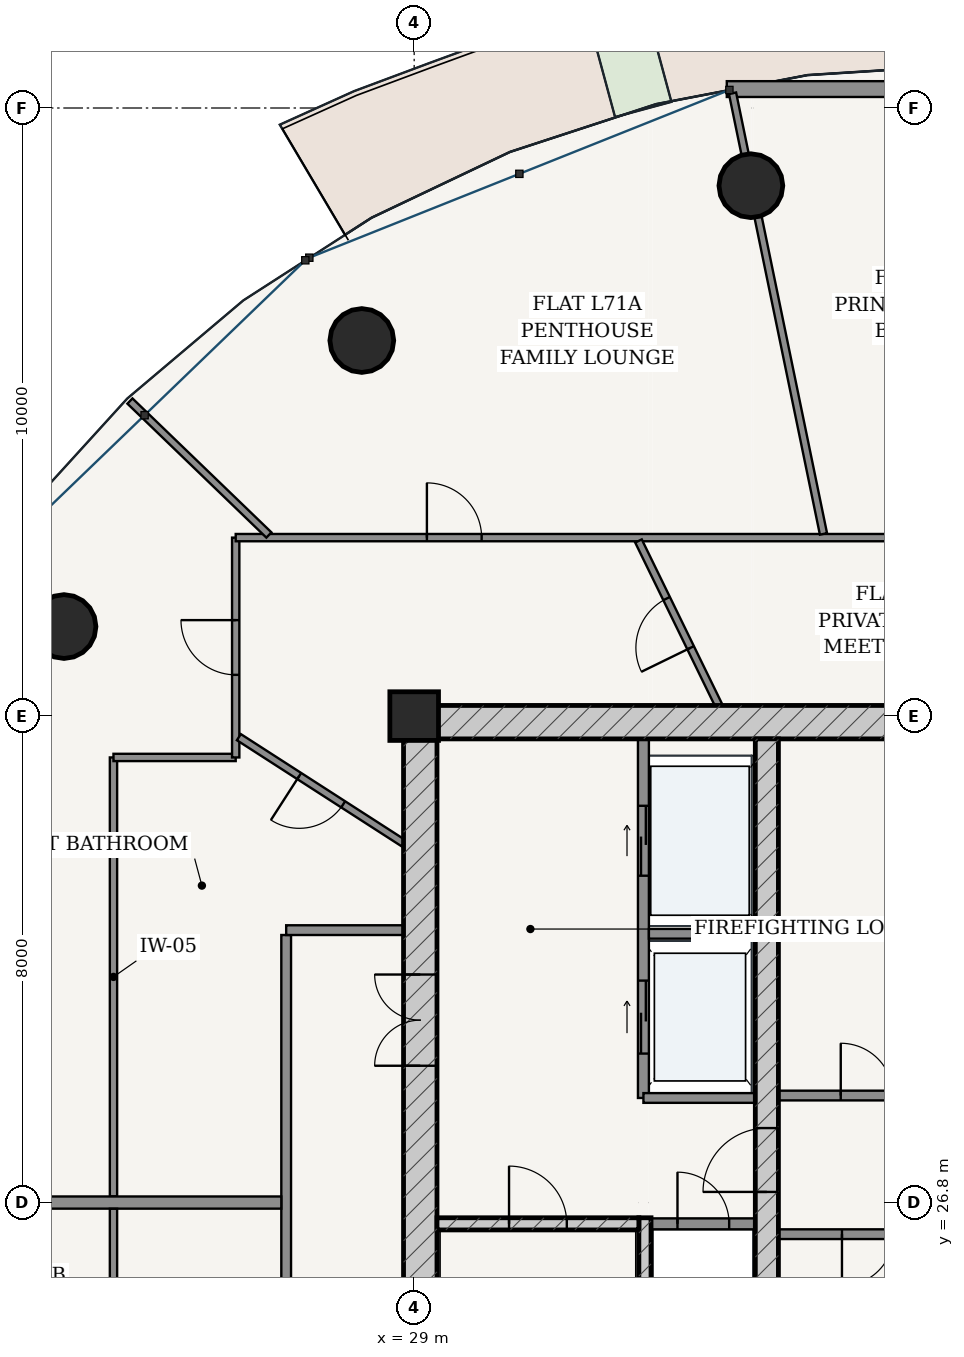
"""IFC4 building model, lengths in metres.
Left out: names, types, materials, properties, quantities, classifications, styles, units other than length and angle.
Written with IfcOpenShell. Run it as: python <this file> out.ifc"""

import sys

from ifc_helpers import new_model, si_unit, direction, frame, frame_2d, origin, origin_2d, place, context, subcontext, project, spatial, rectangle, hollow_circle, extrude, source, transform, mapped, element, fill, save


model = new_model("IFC4")
c1 = context("Model", 3, precision=1e-05, world=origin(), true_north=direction((-0.2419218956, 0.970295726276)))
c2 = subcontext(c1, "Body", "Model", "MODEL_VIEW")
j1 = project(units=[si_unit("LENGTHUNIT", "METRE"), si_unit("PLANEANGLEUNIT", "RADIAN")], contexts=[c1])
p1 = place(None, origin())
s1 = spatial("IfcSite", under=j1, at=p1, CompositionType="ELEMENT")
p2 = place(p1, origin())
s2 = spatial("IfcBuilding", under=s1, at=p2, CompositionType="ELEMENT")
p3 = place(p2, frame((0.0, 0.0, 270.7)))
s3 = spatial("IfcBuildingStorey", under=s2, at=p3, CompositionType="ELEMENT", Elevation=270.7)
p4 = place(p3, frame((29.0, 34.8, 0.0), z_axis=(0.0, 0.0, 1.0), x_axis=(1.0, 0.0, 0.0)))
e1 = element("IfcColumn", 1, at=p4, inside=s3, PredefinedType="COLUMN", context=c2, shape_type="SweptSolid", body=[
    extrude(rectangle(XDim=0.8, YDim=0.8, at=origin_2d()), origin(), (0.0, 0.0, 1.0), 3.75),
])
p5 = place(p3, frame((28.825, 34.7, 0.0), z_axis=(0.0, 0.0, 1.0), x_axis=(1.0, 0.0, 0.0)))
e2 = element("IfcWall", 2, at=p5, inside=s3, PredefinedType="SHEAR", context=c2, shape_type="SweptSolid", body=[
    extrude(rectangle(XDim=18.35, YDim=0.55, at=frame_2d((9.175, 0.0))), origin(), (0.0, 0.0, 1.0), 3.49),
])
p6 = place(p3, frame((29.1, 19.175, 0.0), z_axis=(0.0, 0.0, 1.0), x_axis=(0.0, 1.0, 0.0)))
e3 = element("IfcWall", 3, at=p6, inside=s3, PredefinedType="SHEAR", context=c2, shape_type="SweptSolid", body=[
    extrude(rectangle(XDim=15.25, YDim=0.55, at=frame_2d((7.625, 0.0))), origin(), (0.0, 0.0, 1.0), 3.49),
])
p7 = place(p6, frame((9.875, 0.0, 0.0)))
e4 = element("IfcOpeningElement", 4, at=p7, cuts=e3, PredefinedType="OPENING", context=c2, shape_type="SweptSolid", body=[
    extrude(rectangle(XDim=1.5, YDim=2.2, at=frame_2d((0.75, 1.1))), frame((0.0, 0.285, 0.0), z_axis=(0.0, -1.0, 0.0), x_axis=(1.0, 0.0, 0.0)), (0.0, 0.0, 1.0), 0.57),
])
p8 = place(p3, frame((32.795, 19.175, 0.0), z_axis=(0.0, 0.0, 1.0), x_axis=(0.0, 1.0, 0.0)))
e5 = element("IfcWall", 5, at=p8, inside=s3, PredefinedType="SOLIDWALL", context=c2, shape_type="SweptSolid", body=[
    extrude(rectangle(XDim=7.375, YDim=0.2, at=frame_2d((3.688, 0.0))), origin(), (0.0, 0.0, 1.0), 3.49),
])
p9 = place(p3, frame((29.375, 26.45, 0.0), z_axis=(0.0, 0.0, 1.0), x_axis=(1.0, 0.0, 0.0)))
e6 = element("IfcWall", 6, at=p9, inside=s3, PredefinedType="SOLIDWALL", context=c2, shape_type="SweptSolid", body=[
    extrude(rectangle(XDim=3.32, YDim=0.2, at=frame_2d((1.66, 0.0))), origin(), (0.0, 0.0, 1.0), 3.49),
])
p10 = place(p9, frame((1.185, 0.0, 0.0)))
e7 = element("IfcOpeningElement", 7, at=p10, cuts=e6, PredefinedType="OPENING", context=c2, shape_type="SweptSolid", body=[
    extrude(rectangle(XDim=0.95, YDim=2.15, at=frame_2d((0.475, 1.075))), frame((0.0, 0.11, 0.0), z_axis=(0.0, -1.0, 0.0), x_axis=(1.0, 0.0, 0.0)), (0.0, 0.0, 1.0), 0.22),
])
p11 = place(p3, frame((34.8, 19.175, 0.0), z_axis=(0.0, 0.0, 1.0), x_axis=(0.0, 1.0, 0.0)))
e8 = element("IfcWall", 8, at=p11, inside=s3, PredefinedType="SHEAR", context=c2, shape_type="SweptSolid", body=[
    extrude(rectangle(XDim=15.25, YDim=0.38, at=frame_2d((7.625, 0.0))), origin(), (0.0, 0.0, 1.0), 3.49),
])
p12 = place(p11, frame((7.8, 0.0, 0.0)))
e9 = element("IfcOpeningElement", 9, at=p12, cuts=e8, PredefinedType="OPENING", context=c2, shape_type="SweptSolid", body=[
    extrude(rectangle(XDim=1.05, YDim=2.15, at=frame_2d((0.525, 1.075))), frame((0.0, 0.2, 0.0), z_axis=(0.0, -1.0, 0.0), x_axis=(1.0, 0.0, 0.0)), (0.0, 0.0, 1.0), 0.4),
])
for number, where, z_axis, x_axis in (
    (10, (34.537, 43.522, 0.0), (0.0, 0.0, 1.0), (1.0, 0.0, 0.0)),
    (11, (28.139, 40.977, 0.0), (0.0, 0.0, 1.0), (1.0, 0.0, 0.0)),
    (12, (23.241, 36.272, 0.0), (0.0, 0.0, 1.0), (1.0, 0.0, 0.0)),
):
    element("IfcColumn", number, at=place(p3, frame(where, z_axis=z_axis, x_axis=x_axis)), inside=s3, PredefinedType="COLUMN", context=c2, shape_type="SweptSolid", body=[
        extrude(hollow_circle(Radius=0.525, WallThickness=0.035, at=origin_2d()), origin(), (0.0, 0.0, 1.0), 3.75),
    ])
p13 = place(p3, frame((41.859, 45.111, 0.0), z_axis=(0.0, 0.0, 1.0), x_axis=(-1.0, 0.0, 0.0)))
e13 = element("IfcWall", 13, at=p13, inside=s3, PredefinedType="SOLIDWALL", context=c2, shape_type="SweptSolid", body=[
    extrude(rectangle(XDim=7.718, YDim=0.26, at=frame_2d((3.859, 0.0))), origin(), (0.0, 0.0, 1.0), 3.49),
])
p14 = place(p13, frame((3.184, 0.0, 0.0)))
e14 = element("IfcOpeningElement", 14, at=p14, cuts=e13, PredefinedType="OPENING", context=c2, shape_type="SweptSolid", body=[
    extrude(rectangle(XDim=1.35, YDim=2.2, at=frame_2d((0.675, 1.1))), frame((0.0, 0.14, 0.0), z_axis=(0.0, -1.0, 0.0), x_axis=(1.0, 0.0, 0.0)), (0.0, 0.0, 1.0), 0.28),
])
p15 = place(p3, frame((32.9, 26.45, 0.0), z_axis=(0.0, 0.0, 1.0), x_axis=(1.0, 0.0, 0.0)))
e15 = element("IfcWall", 15, at=p15, inside=s3, PredefinedType="PARTITIONING", context=c2, shape_type="SweptSolid", body=[
    extrude(rectangle(XDim=1.71, YDim=0.18, at=frame_2d((0.855, 0.0))), origin(), (0.0, 0.0, 1.0), 3.49),
])
p16 = place(p15, frame((0.43, 0.0, 0.0)))
e16 = element("IfcOpeningElement", 16, at=p16, cuts=e15, PredefinedType="OPENING", context=c2, shape_type="SweptSolid", body=[
    extrude(rectangle(XDim=0.85, YDim=2.1, at=frame_2d((0.425, 1.05))), frame((0.0, 0.1, 0.0), z_axis=(0.0, -1.0, 0.0), x_axis=(1.0, 0.0, 0.0)), (0.0, 0.0, 1.0), 0.2),
])
p17 = place(p3, frame((32.77, 28.52, 0.0), z_axis=(0.0, 0.0, 1.0), x_axis=(0.0, 1.0, 0.0)))
e17 = element("IfcWall", 17, at=p17, inside=s3, PredefinedType="PARTITIONING", context=c2, shape_type="SweptSolid", body=[
    extrude(rectangle(XDim=5.905, YDim=0.18, at=frame_2d((2.953, 0.0))), origin(), (0.0, 0.0, 1.0), 3.49),
])
p18 = place(p17, frame((3.655, 0.0, 0.0)))
e18 = element("IfcOpeningElement", 18, at=p18, cuts=e17, PredefinedType="OPENING", context=c2, shape_type="SweptSolid", body=[
    extrude(rectangle(XDim=1.15, YDim=2.2, at=frame_2d((0.575, 1.1))), frame((0.0, 0.1, 0.0), z_axis=(0.0, -1.0, 0.0), x_axis=(1.0, 0.0, 0.0)), (0.0, 0.0, 1.0), 0.2),
])
p19 = place(p17, frame((0.73, 0.0, 0.0)))
e19 = element("IfcOpeningElement", 19, at=p19, cuts=e17, PredefinedType="OPENING", context=c2, shape_type="SweptSolid", body=[
    extrude(rectangle(XDim=1.2, YDim=2.25, at=frame_2d((0.6, 1.125))), frame((0.0, 0.1, 0.0), z_axis=(0.0, -1.0, 0.0), x_axis=(1.0, 0.0, 0.0)), (0.0, 0.0, 1.0), 0.2),
])
p20 = place(p3, frame((32.86, 31.22, 0.0), z_axis=(0.0, 0.0, 1.0), x_axis=(1.0, 0.0, 0.0)))
e20 = element("IfcWall", 20, at=p20, inside=s3, PredefinedType="PARTITIONING", context=c2, shape_type="SweptSolid", body=[
    extrude(rectangle(XDim=1.75, YDim=0.16, at=frame_2d((0.875, 0.0))), origin(), (0.0, 0.0, 1.0), 3.49),
])
p21 = place(p3, frame((32.77, 28.52, 0.0), z_axis=(0.0, 0.0, 1.0), x_axis=(1.0, 0.0, 0.0)))
e21 = element("IfcWall", 21, at=p21, inside=s3, PredefinedType="PARTITIONING", context=c2, shape_type="SweptSolid", body=[
    extrude(rectangle(XDim=1.84, YDim=0.16, at=frame_2d((0.92, 0.0))), origin(), (0.0, 0.0, 1.0), 3.49),
])
p22 = place(p3, frame((34.99, 28.56, 0.0), z_axis=(0.0, 0.0, 1.0), x_axis=(1.0, 0.0, 0.0)))
e22 = element("IfcWall", 22, at=p22, inside=s3, PredefinedType="PARTITIONING", context=c2, shape_type="SweptSolid", body=[
    extrude(rectangle(XDim=6.02, YDim=0.16, at=frame_2d((3.01, 0.0))), origin(), (0.0, 0.0, 1.0), 3.49),
])
p23 = place(p22, frame((1.025, 0.0, 0.0)))
e23 = element("IfcOpeningElement", 23, at=p23, cuts=e22, PredefinedType="OPENING", context=c2, shape_type="SweptSolid", body=[
    extrude(rectangle(XDim=0.86, YDim=2.1, at=frame_2d((0.43, 1.05))), frame((0.0, 0.09, 0.0), z_axis=(0.0, -1.0, 0.0), x_axis=(1.0, 0.0, 0.0)), (0.0, 0.0, 1.0), 0.18),
])
p24 = place(p22, frame((4.14, 0.0, 0.0)))
e24 = element("IfcOpeningElement", 24, at=p24, cuts=e22, PredefinedType="OPENING", context=c2, shape_type="SweptSolid", body=[
    extrude(rectangle(XDim=0.85, YDim=2.1, at=frame_2d((0.425, 1.05))), frame((0.0, 0.09, 0.0), z_axis=(0.0, -1.0, 0.0), x_axis=(1.0, 0.0, 0.0)), (0.0, 0.0, 1.0), 0.18),
])
p25 = place(p3, frame((34.99, 26.28, 0.0), z_axis=(0.0, 0.0, 1.0), x_axis=(1.0, 0.0, 0.0)))
e25 = element("IfcWall", 25, at=p25, inside=s3, PredefinedType="PARTITIONING", context=c2, shape_type="SweptSolid", body=[
    extrude(rectangle(XDim=6.02, YDim=0.16, at=frame_2d((3.01, 0.0))), origin(), (0.0, 0.0, 1.0), 3.49),
])
p26 = place(p25, frame((1.045, 0.0, 0.0)))
e26 = element("IfcOpeningElement", 26, at=p26, cuts=e25, PredefinedType="OPENING", context=c2, shape_type="SweptSolid", body=[
    extrude(rectangle(XDim=0.85, YDim=2.1, at=frame_2d((0.425, 1.05))), frame((0.0, 0.09, 0.0), z_axis=(0.0, -1.0, 0.0), x_axis=(1.0, 0.0, 0.0)), (0.0, 0.0, 1.0), 0.18),
])
p27 = place(p25, frame((3.215, 0.0, 0.0)))
e27 = element("IfcOpeningElement", 27, at=p27, cuts=e25, PredefinedType="OPENING", context=c2, shape_type="SweptSolid", body=[
    extrude(rectangle(XDim=1.1, YDim=2.2, at=frame_2d((0.55, 1.1))), frame((0.0, 0.09, 0.0), z_axis=(0.0, -1.0, 0.0), x_axis=(1.0, 0.0, 0.0)), (0.0, 0.0, 1.0), 0.18),
])
p28 = place(p25, frame((4.695, 0.0, 0.0)))
e28 = element("IfcOpeningElement", 28, at=p28, cuts=e25, PredefinedType="OPENING", context=c2, shape_type="SweptSolid", body=[
    extrude(rectangle(XDim=1.1, YDim=2.2, at=frame_2d((0.55, 1.1))), frame((0.0, 0.09, 0.0), z_axis=(0.0, -1.0, 0.0), x_axis=(1.0, 0.0, 0.0)), (0.0, 0.0, 1.0), 0.18),
])
p29 = place(p3, frame((26.895, 17.275, 0.0), z_axis=(0.0, 0.0, 1.0), x_axis=(0.0, 1.0, 0.0)))
e29 = element("IfcWall", 29, at=p29, inside=s3, PredefinedType="PARTITIONING", context=c2, shape_type="SweptSolid", body=[
    extrude(rectangle(XDim=13.925, YDim=0.16, at=frame_2d((6.962, 0.0))), origin(), (0.0, 0.0, 1.0), 3.015),
])
p30 = place(p29, frame((2.735, 0.0, 0.0)))
e30 = element("IfcOpeningElement", 30, at=p30, cuts=e29, PredefinedType="OPENING", context=c2, shape_type="SweptSolid", body=[
    extrude(rectangle(XDim=0.98, YDim=2.2, at=frame_2d((0.49, 1.1))), frame((0.0, 0.09, 0.0), z_axis=(0.0, -1.0, 0.0), x_axis=(1.0, 0.0, 0.0)), (0.0, 0.0, 1.0), 0.18),
])
p31 = place(p3, frame((26.895, 31.28, 0.0), z_axis=(0.0, 0.0, 1.0), x_axis=(1.0, 0.0, 0.0)))
e31 = element("IfcWall", 31, at=p31, inside=s3, PredefinedType="PARTITIONING", context=c2, shape_type="SweptSolid", body=[
    extrude(rectangle(XDim=1.93, YDim=0.16, at=frame_2d((0.965, 0.0))), origin(), (0.0, 0.0, 1.0), 3.49),
])
p32 = place(p3, frame((24.055, 26.902, 0.0), z_axis=(0.0, 0.0, 1.0), x_axis=(0.0, 1.0, 0.0)))
e32 = element("IfcWall", 32, at=p32, inside=s3, PredefinedType="PARTITIONING", context=c2, shape_type="SweptSolid", body=[
    extrude(rectangle(XDim=7.218, YDim=0.12, at=frame_2d((3.609, 0.0))), origin(), (0.0, 0.0, 1.0), 3.015),
])
p33 = place(p3, frame((24.055, 34.12, 0.0), z_axis=(0.0, 0.0, 1.0), x_axis=(1.0, 0.0, 0.0)))
e33 = element("IfcWall", 33, at=p33, inside=s3, PredefinedType="PARTITIONING", context=c2, shape_type="SweptSolid", body=[
    extrude(rectangle(XDim=2.01, YDim=0.12, at=frame_2d((1.005, 0.0))), origin(), (0.0, 0.0, 1.0), 3.209),
])
p34 = place(p3, frame((26.065, 34.12, 0.0), z_axis=(0.0, 0.0, 1.0), x_axis=(0.0, 1.0, 0.0)))
e34 = element("IfcWall", 34, at=p34, inside=s3, PredefinedType="PARTITIONING", context=c2, shape_type="SweptSolid", body=[
    extrude(rectangle(XDim=3.615, YDim=0.12, at=frame_2d((1.808, 0.0))), origin(), (0.0, 0.0, 1.0), 3.015),
])
p35 = place(p34, frame((1.358, 0.0, 0.0)))
e35 = element("IfcOpeningElement", 35, at=p35, cuts=e34, PredefinedType="OPENING", context=c2, shape_type="SweptSolid", body=[
    extrude(rectangle(XDim=0.9, YDim=2.15, at=frame_2d((0.45, 1.075))), frame((0.0, 0.07, 0.0), z_axis=(0.0, -1.0, 0.0), x_axis=(1.0, 0.0, 0.0)), (0.0, 0.0, 1.0), 0.14),
])
p36 = place(p3, frame((26.065, 37.735, 0.0), z_axis=(0.0, 0.0, 1.0), x_axis=(1.0, 0.0, 0.0)))
e36 = element("IfcWall", 36, at=p36, inside=s3, PredefinedType="PARTITIONING", context=c2, shape_type="SweptSolid", body=[
    extrude(rectangle(XDim=23.87, YDim=0.12, at=frame_2d((11.935, 0.0))), origin(), (0.0, 0.0, 1.0), 3.015),
])
p37 = place(p36, frame((18.46, 0.0, 0.0)))
e37 = element("IfcOpeningElement", 37, at=p37, cuts=e36, PredefinedType="OPENING", context=c2, shape_type="SweptSolid", body=[
    extrude(rectangle(XDim=0.9, YDim=2.15, at=frame_2d((0.45, 1.075))), frame((0.0, 0.07, 0.0), z_axis=(0.0, -1.0, 0.0), x_axis=(1.0, 0.0, 0.0)), (0.0, 0.0, 1.0), 0.14),
])
p38 = place(p36, frame((3.144, 0.0, 0.0)))
e38 = element("IfcOpeningElement", 38, at=p38, cuts=e36, PredefinedType="OPENING", context=c2, shape_type="SweptSolid", body=[
    extrude(rectangle(XDim=0.9, YDim=2.15, at=frame_2d((0.45, 1.075))), frame((0.0, 0.07, 0.0), z_axis=(0.0, -1.0, 0.0), x_axis=(1.0, 0.0, 0.0)), (0.0, 0.0, 1.0), 0.14),
])
p39 = place(p3, frame((35.731, 37.796, 0.0), z_axis=(0.0, 0.0, 1.0), x_axis=(-0.202101574245, 0.979364566281, 0.0)))
e39 = element("IfcWall", 39, at=p39, inside=s3, PredefinedType="PARTITIONING", context=c2, shape_type="SweptSolid", body=[
    extrude(rectangle(XDim=7.4, YDim=0.12, at=frame_2d((3.7, 0.0))), origin(), (0.0, 0.0, 1.0), 3.015),
])
p40 = place(p3, frame((26.611, 37.778, 0.0), z_axis=(0.0, 0.0, 1.0), x_axis=(-0.719985652574, 0.693988948102, 0.0)))
e40 = element("IfcWall", 40, at=p40, inside=s3, PredefinedType="PARTITIONING", context=c2, shape_type="SweptSolid", body=[
    extrude(rectangle(XDim=3.174, YDim=0.12, at=frame_2d((1.587, 0.0))), origin(), (0.0, 0.0, 1.0), 3.121),
])
p41 = place(p3, frame((34.008, 34.977, 0.0), z_axis=(0.0, 0.0, 1.0), x_axis=(-0.438717914863, 0.898624833386, 0.0)))
e41 = element("IfcWall", 41, at=p41, inside=s3, PredefinedType="PARTITIONING", context=c2, shape_type="SweptSolid", body=[
    extrude(rectangle(XDim=3.007, YDim=0.12, at=frame_2d((1.504, 0.0))), origin(), (0.0, 0.0, 1.0), 3.49),
])
p42 = place(p41, frame((1.054, 0.0, 0.0)))
e42 = element("IfcOpeningElement", 42, at=p42, cuts=e41, PredefinedType="OPENING", context=c2, shape_type="SweptSolid", body=[
    extrude(rectangle(XDim=0.9, YDim=2.15, at=frame_2d((0.45, 1.075))), frame((0.0, 0.07, 0.0), z_axis=(0.0, -1.0, 0.0), x_axis=(1.0, 0.0, 0.0)), (0.0, 0.0, 1.0), 0.14),
])
p43 = place(p3, frame((28.825, 32.709, 0.0), z_axis=(0.0, 0.0, 1.0), x_axis=(-0.840692964871, 0.541512085568, 0.0)))
e43 = element("IfcWall", 43, at=p43, inside=s3, PredefinedType="PARTITIONING", context=c2, shape_type="SweptSolid", body=[
    extrude(rectangle(XDim=3.221, YDim=0.12, at=frame_2d((1.61, 0.0))), origin(), (0.0, 0.0, 1.0), 3.015),
])
p44 = place(p43, frame((1.18, 0.0, 0.0)))
e44 = element("IfcOpeningElement", 44, at=p44, cuts=e43, PredefinedType="OPENING", context=c2, shape_type="SweptSolid", body=[
    extrude(rectangle(XDim=0.86, YDim=2.15, at=frame_2d((0.43, 1.075))), frame((0.0, 0.07, 0.0), z_axis=(0.0, -1.0, 0.0), x_axis=(1.0, 0.0, 0.0)), (0.0, 0.0, 1.0), 0.14),
])
p45 = place(p3, frame((26.815, 26.8, 0.0), z_axis=(0.0, 0.0, 1.0), x_axis=(-1.0, 0.0, 0.0)))
e45 = element("IfcWall", 45, at=p45, inside=s3, PredefinedType="PARTITIONING", context=c2, shape_type="SweptSolid", body=[
    extrude(rectangle(XDim=8.155, YDim=0.2, at=frame_2d((4.078, 0.0))), origin(), (0.0, 0.0, 1.0), 3.121),
])
p46 = place(p3, frame((24.055, 14.355, 0.0), z_axis=(0.0, 0.0, 1.0), x_axis=(0.0, 1.0, 0.0)))
e46 = element("IfcWall", 46, at=p46, inside=s3, PredefinedType="PARTITIONING", context=c2, shape_type="SweptSolid", body=[
    extrude(rectangle(XDim=12.343, YDim=0.12, at=frame_2d((6.171, 0.0))), origin(), (0.0, 0.0, 1.0), 3.015),
])
p47 = place(p46, frame((5.442, 0.0, 0.0)))
e47 = element("IfcOpeningElement", 47, at=p47, cuts=e46, PredefinedType="OPENING", context=c2, shape_type="SweptSolid", body=[
    extrude(rectangle(XDim=0.9, YDim=2.15, at=frame_2d((0.45, 1.075))), frame((0.0, 0.07, 0.0), z_axis=(0.0, -1.0, 0.0), x_axis=(1.0, 0.0, 0.0)), (0.0, 0.0, 1.0), 0.14),
])
m1 = source(origin(), c2, "Body", "SweptSolid", [
    extrude(rectangle(XDim=1.5, YDim=2.2, at=frame_2d((0.75, 1.1))), frame((0.0, 0.025, 0.0), z_axis=(0.0, -1.0, 0.0), x_axis=(1.0, 0.0, 0.0)), (0.0, 0.0, 1.0), 0.05),
])
p48 = place(p7, origin())
e48 = element("IfcDoor", 48, at=p48, inside=s3, OperationType="DOUBLE_DOOR_SINGLE_SWING", PredefinedType="DOOR", context=c2, shape_type="MappedRepresentation", body=[
    mapped(m1, transform((0.0, 0.0, 0.0), scale=1.0)),
])
fill(e4, e48)
m2 = source(origin(), c2, "Body", "SweptSolid", [
    extrude(rectangle(XDim=1.05, YDim=2.15, at=frame_2d((0.525, 1.075))), frame((0.0, 0.025, 0.0), z_axis=(0.0, -1.0, 0.0), x_axis=(1.0, 0.0, 0.0)), (0.0, 0.0, 1.0), 0.05),
])
p49 = place(p12, origin())
e49 = element("IfcDoor", 49, at=p49, inside=s3, OperationType="SINGLE_SWING_LEFT", PredefinedType="DOOR", context=c2, shape_type="MappedRepresentation", body=[
    mapped(m2, transform((0.0, 0.0, 0.0), scale=1.0)),
])
fill(e9, e49)
m3 = source(origin(), c2, "Body", "SweptSolid", [
    extrude(rectangle(XDim=0.95, YDim=2.15, at=frame_2d((0.475, 1.075))), frame((0.0, 0.025, 0.0), z_axis=(0.0, -1.0, 0.0), x_axis=(1.0, 0.0, 0.0)), (0.0, 0.0, 1.0), 0.05),
])
p50 = place(p10, origin())
e50 = element("IfcDoor", 50, at=p50, inside=s3, OperationType="SINGLE_SWING_LEFT", PredefinedType="DOOR", context=c2, shape_type="MappedRepresentation", body=[
    mapped(m3, transform((0.0, 0.0, 0.0), scale=1.0)),
])
fill(e7, e50)
m4 = source(origin(), c2, "Body", "SweptSolid", [
    extrude(rectangle(XDim=0.85, YDim=2.1, at=frame_2d((0.425, 1.05))), frame((0.0, 0.025, 0.0), z_axis=(0.0, -1.0, 0.0), x_axis=(1.0, 0.0, 0.0)), (0.0, 0.0, 1.0), 0.05),
])
p51 = place(p16, origin())
e51 = element("IfcDoor", 51, at=p51, inside=s3, OperationType="SINGLE_SWING_LEFT", PredefinedType="DOOR", context=c2, shape_type="MappedRepresentation", body=[
    mapped(m4, transform((0.0, 0.0, 0.0), scale=1.0)),
])
fill(e16, e51)
m5 = source(origin(), c2, "Body", "SweptSolid", [
    extrude(rectangle(XDim=0.86, YDim=2.1, at=frame_2d((0.43, 1.05))), frame((0.0, 0.025, 0.0), z_axis=(0.0, -1.0, 0.0), x_axis=(1.0, 0.0, 0.0)), (0.0, 0.0, 1.0), 0.05),
])
p52 = place(p23, origin())
e52 = element("IfcDoor", 52, at=p52, inside=s3, OperationType="SINGLE_SWING_LEFT", PredefinedType="DOOR", context=c2, shape_type="MappedRepresentation", body=[
    mapped(m5, transform((0.0, 0.0, 0.0), scale=1.0)),
])
fill(e23, e52)
p53 = place(p26, frame((0.85, 0.0, 0.0), z_axis=(0.0, 0.0, 1.0), x_axis=(-1.0, 0.0, 0.0)))
e53 = element("IfcDoor", 53, at=p53, inside=s3, OperationType="SINGLE_SWING_RIGHT", PredefinedType="DOOR", context=c2, shape_type="MappedRepresentation", body=[
    mapped(m4, transform((0.0, 0.0, 0.0), scale=1.0)),
])
fill(e26, e53)
m6 = source(origin(), c2, "Body", "SweptSolid", [
    extrude(rectangle(XDim=1.15, YDim=2.2, at=frame_2d((0.575, 1.1))), frame((0.0, 0.025, 0.0), z_axis=(0.0, -1.0, 0.0), x_axis=(1.0, 0.0, 0.0)), (0.0, 0.0, 1.0), 0.05),
])
p54 = place(p18, origin())
e54 = element("IfcDoor", 54, at=p54, inside=s3, OperationType="DOUBLE_DOOR_SLIDING", PredefinedType="DOOR", context=c2, shape_type="MappedRepresentation", body=[
    mapped(m6, transform((0.0, 0.0, 0.0), scale=1.0)),
])
fill(e18, e54)
m7 = source(origin(), c2, "Body", "SweptSolid", [
    extrude(rectangle(XDim=1.2, YDim=2.25, at=frame_2d((0.6, 1.125))), frame((0.0, 0.025, 0.0), z_axis=(0.0, -1.0, 0.0), x_axis=(1.0, 0.0, 0.0)), (0.0, 0.0, 1.0), 0.05),
])
p55 = place(p19, origin())
e55 = element("IfcDoor", 55, at=p55, inside=s3, OperationType="DOUBLE_DOOR_SLIDING", PredefinedType="DOOR", context=c2, shape_type="MappedRepresentation", body=[
    mapped(m7, transform((0.0, 0.0, 0.0), scale=1.0)),
])
fill(e19, e55)
m8 = source(origin(), c2, "Body", "SweptSolid", [
    extrude(rectangle(XDim=0.9, YDim=2.15, at=frame_2d((0.45, 1.075))), frame((0.0, 0.025, 0.0), z_axis=(0.0, -1.0, 0.0), x_axis=(1.0, 0.0, 0.0)), (0.0, 0.0, 1.0), 0.05),
])
p56 = place(p42, origin())
e56 = element("IfcDoor", 56, at=p56, inside=s3, OperationType="SINGLE_SWING_LEFT", PredefinedType="DOOR", context=c2, shape_type="MappedRepresentation", body=[
    mapped(m8, transform((0.0, 0.0, 0.0), scale=1.0)),
])
fill(e42, e56)
m9 = source(origin(), c2, "Body", "SweptSolid", [
    extrude(rectangle(XDim=0.86, YDim=2.15, at=frame_2d((0.43, 1.075))), frame((0.0, 0.025, 0.0), z_axis=(0.0, -1.0, 0.0), x_axis=(1.0, 0.0, 0.0)), (0.0, 0.0, 1.0), 0.05),
])
p57 = place(p44, origin())
e57 = element("IfcDoor", 57, at=p57, inside=s3, OperationType="SINGLE_SWING_RIGHT", PredefinedType="DOOR", context=c2, shape_type="MappedRepresentation", body=[
    mapped(m9, transform((0.0, 0.0, 0.0), scale=1.0)),
])
fill(e44, e57)
p58 = place(p38, origin())
e58 = element("IfcDoor", 58, at=p58, inside=s3, OperationType="SINGLE_SWING_LEFT", PredefinedType="DOOR", context=c2, shape_type="MappedRepresentation", body=[
    mapped(m8, transform((0.0, 0.0, 0.0), scale=1.0)),
])
fill(e38, e58)
p59 = place(p35, origin())
e59 = element("IfcDoor", 59, at=p59, inside=s3, OperationType="SINGLE_SWING_RIGHT", PredefinedType="DOOR", context=c2, shape_type="MappedRepresentation", body=[
    mapped(m8, transform((0.0, 0.0, 0.0), scale=1.0)),
])
fill(e35, e59)
save(model, sys.argv[1])
